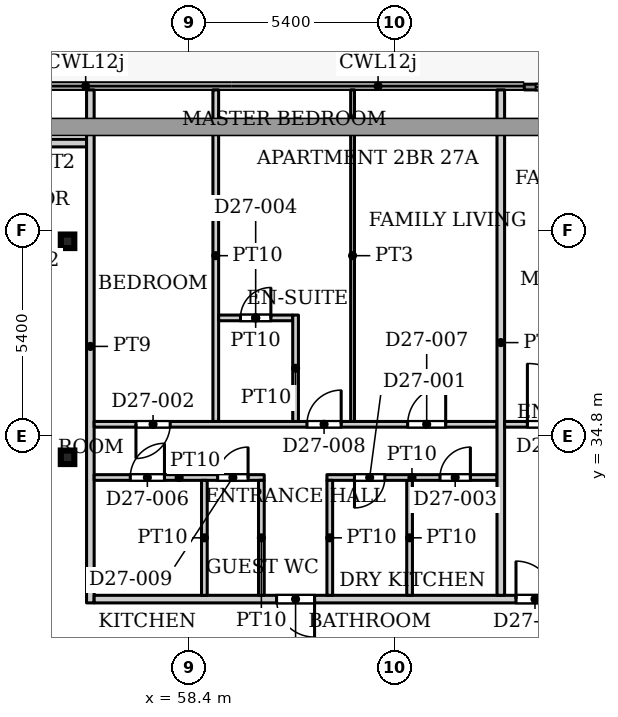
"""IFC4 building model, lengths in metres.
Left out: names, types, materials, properties, quantities, classifications, styles, units other than length and angle.
Written with IfcOpenShell. Run it as: python <this file> out.ifc"""

import sys

from ifc_helpers import new_model, si_unit, direction, frame, frame_2d, origin, origin_2d, place, context, subcontext, project, spatial, rectangle, hollow_rectangle, extrude, source, transform, mapped, element, fill, save


model = new_model("IFC4")
c1 = context("Model", 3, precision=1e-05, world=origin(), true_north=direction((0.0, 1.0)))
c2 = subcontext(c1, "Body", "Model", "MODEL_VIEW")
j1 = project(units=[si_unit("LENGTHUNIT", "METRE"), si_unit("PLANEANGLEUNIT", "RADIAN")], contexts=[c1])
p1 = place(None, origin())
s1 = spatial("IfcSite", under=j1, at=p1, CompositionType="ELEMENT")
p2 = place(p1, origin())
s2 = spatial("IfcBuilding", under=s1, at=p2, CompositionType="ELEMENT")
p3 = place(p2, frame((0.0, 0.0, 117.5)))
s3 = spatial("IfcBuildingStorey", under=s2, at=p3, CompositionType="ELEMENT", Elevation=117.5)
for number, where, z_axis, x_axis in (
    (1, (55.2, 34.232, 0.0), (0.0, 0.0, 1.0), (1.0, 0.0, 0.0)),
    (2, (55.2, 39.916, 0.0), (0.0, 0.0, 1.0), (1.0, 0.0, 0.0)),
):
    element("IfcColumn", number, at=place(p3, frame(where, z_axis=z_axis, x_axis=x_axis)), inside=s3, PredefinedType="COLUMN", context=c2, shape_type="SweptSolid", body=[
        extrude(hollow_rectangle(XDim=0.356, YDim=0.356, WallThickness=0.016, InnerFilletRadius=0.016, OuterFilletRadius=0.032, at=origin_2d()), origin(), (0.0, 0.0, 1.0), 3.9),
    ])
p4 = place(p3, frame((67.218, 43.975, 0.0), z_axis=(0.0, 0.0, 1.0), x_axis=(1.0, 0.0, 0.0)))
e3 = element("IfcWall", 3, at=p4, inside=s3, PredefinedType="SOLIDWALL", context=c2, shape_type="SweptSolid", body=[
    extrude(rectangle(XDim=2.4, YDim=0.15, at=frame_2d((1.2, 0.0))), origin(), (0.0, 0.0, 1.0), 3.75),
])
p5 = place(p4, frame((0.3, 0.0, 0.0)))
e4 = element("IfcOpeningElement", 4, at=p5, cuts=e3, PredefinedType="OPENING", context=c2, shape_type="SweptSolid", body=[
    extrude(rectangle(XDim=1.8, YDim=2.4, at=frame_2d((0.9, 1.2))), frame((0.0, 0.085, 0.0), z_axis=(0.0, -1.0, 0.0), x_axis=(1.0, 0.0, 0.0)), (0.0, 0.0, 1.0), 0.17),
])
p6 = place(p3, frame((53.5, 42.5, 0.0), z_axis=(0.0, 0.0, 1.0), x_axis=(1.0, 0.0, 0.0)))
e5 = element("IfcWall", 5, at=p6, inside=s3, PredefinedType="PARTITIONING", context=c2, shape_type="SweptSolid", body=[
    extrude(rectangle(XDim=2.2, YDim=0.2, at=frame_2d((1.1, 0.0))), origin(), (0.0, 0.0, 1.0), 3.6),
])
p7 = place(p3, frame((55.8, 30.4, 0.0), z_axis=(0.0, 0.0, 1.0), x_axis=(0.0, 1.0, 0.0)))
e6 = element("IfcWall", 6, at=p7, inside=s3, PredefinedType="PARTITIONING", context=c2, shape_type="SweptSolid", body=[
    extrude(rectangle(XDim=13.5, YDim=0.2, at=frame_2d((6.75, 0.0))), origin(), (0.0, 0.0, 1.0), 3.6),
])
p8 = place(p3, frame((55.9, 30.5, 0.0), z_axis=(0.0, 0.0, 1.0), x_axis=(1.0, 0.0, 0.0)))
e7 = element("IfcWall", 7, at=p8, inside=s3, PredefinedType="PARTITIONING", context=c2, shape_type="SweptSolid", body=[
    extrude(rectangle(XDim=42.2, YDim=0.2, at=frame_2d((21.1, 0.0))), origin(), (0.0, 0.0, 1.0), 3.6),
])
p9 = place(p8, frame((4.8, 0.0, 0.0)))
e8 = element("IfcOpeningElement", 8, at=p9, cuts=e7, PredefinedType="OPENING", context=c2, shape_type="SweptSolid", body=[
    extrude(rectangle(XDim=1.0, YDim=2.1, at=frame_2d((0.5, 1.05))), frame((0.0, 0.11, 0.0), z_axis=(0.0, -1.0, 0.0), x_axis=(1.0, 0.0, 0.0)), (0.0, 0.0, 1.0), 0.22),
])
p10 = place(p8, frame((11.1, 0.0, 0.0)))
e9 = element("IfcOpeningElement", 9, at=p10, cuts=e7, PredefinedType="OPENING", context=c2, shape_type="SweptSolid", body=[
    extrude(rectangle(XDim=1.0, YDim=2.1, at=frame_2d((0.5, 1.05))), frame((0.0, 0.11, 0.0), z_axis=(0.0, -1.0, 0.0), x_axis=(1.0, 0.0, 0.0)), (0.0, 0.0, 1.0), 0.22),
])
p11 = place(p8, frame((39.0, 0.0, 0.0)))
e10 = element("IfcOpeningElement", 10, at=p11, cuts=e7, PredefinedType="OPENING", context=c2, shape_type="SweptSolid", body=[
    extrude(rectangle(XDim=1.0, YDim=2.1, at=frame_2d((0.5, 1.05))), frame((0.0, 0.11, 0.0), z_axis=(0.0, -1.0, 0.0), x_axis=(1.0, 0.0, 0.0)), (0.0, 0.0, 1.0), 0.22),
])
p12 = place(p3, frame((55.9, 33.7, 0.0), z_axis=(0.0, 0.0, 1.0), x_axis=(1.0, 0.0, 0.0)))
e11 = element("IfcWall", 11, at=p12, inside=s3, PredefinedType="PARTITIONING", context=c2, shape_type="SweptSolid", body=[
    extrude(rectangle(XDim=4.475, YDim=0.15, at=frame_2d((2.238, 0.0))), origin(), (0.0, 0.0, 1.0), 3.6),
])
p13 = place(p12, frame((0.95, 0.0, 0.0)))
e12 = element("IfcOpeningElement", 12, at=p13, cuts=e11, PredefinedType="OPENING", context=c2, shape_type="SweptSolid", body=[
    extrude(rectangle(XDim=0.9, YDim=2.1, at=frame_2d((0.45, 1.05))), frame((0.0, 0.085, 0.0), z_axis=(0.0, -1.0, 0.0), x_axis=(1.0, 0.0, 0.0)), (0.0, 0.0, 1.0), 0.17),
])
p14 = place(p12, frame((3.25, 0.0, 0.0)))
e13 = element("IfcOpeningElement", 13, at=p14, cuts=e11, PredefinedType="OPENING", context=c2, shape_type="SweptSolid", body=[
    extrude(rectangle(XDim=0.8, YDim=2.1, at=frame_2d((0.4, 1.05))), frame((0.0, 0.085, 0.0), z_axis=(0.0, -1.0, 0.0), x_axis=(1.0, 0.0, 0.0)), (0.0, 0.0, 1.0), 0.17),
])
p15 = place(p3, frame((55.9, 35.1, 0.0), z_axis=(0.0, 0.0, 1.0), x_axis=(1.0, 0.0, 0.0)))
e14 = element("IfcWall", 14, at=p15, inside=s3, PredefinedType="PARTITIONING", context=c2, shape_type="SweptSolid", body=[
    extrude(rectangle(XDim=10.6, YDim=0.15, at=frame_2d((5.3, 0.0))), origin(), (0.0, 0.0, 1.0), 3.6),
])
p16 = place(p15, frame((1.1, 0.0, 0.0)))
e15 = element("IfcOpeningElement", 15, at=p16, cuts=e14, PredefinedType="OPENING", context=c2, shape_type="SweptSolid", body=[
    extrude(rectangle(XDim=0.9, YDim=2.1, at=frame_2d((0.45, 1.05))), frame((0.0, 0.085, 0.0), z_axis=(0.0, -1.0, 0.0), x_axis=(1.0, 0.0, 0.0)), (0.0, 0.0, 1.0), 0.17),
])
p17 = place(p15, frame((8.25, 0.0, 0.0)))
e16 = element("IfcOpeningElement", 16, at=p17, cuts=e14, PredefinedType="OPENING", context=c2, shape_type="SweptSolid", body=[
    extrude(rectangle(XDim=1.0, YDim=2.1, at=frame_2d((0.5, 1.05))), frame((0.0, 0.085, 0.0), z_axis=(0.0, -1.0, 0.0), x_axis=(1.0, 0.0, 0.0)), (0.0, 0.0, 1.0), 0.17),
])
p18 = place(p15, frame((5.6, 0.0, 0.0)))
e17 = element("IfcOpeningElement", 17, at=p18, cuts=e14, PredefinedType="OPENING", context=c2, shape_type="SweptSolid", body=[
    extrude(rectangle(XDim=0.9, YDim=2.1, at=frame_2d((0.45, 1.05))), frame((0.0, 0.085, 0.0), z_axis=(0.0, -1.0, 0.0), x_axis=(1.0, 0.0, 0.0)), (0.0, 0.0, 1.0), 0.17),
])
p19 = place(p3, frame((58.8, 30.6, 0.0), z_axis=(0.0, 0.0, 1.0), x_axis=(0.0, 1.0, 0.0)))
e18 = element("IfcWall", 18, at=p19, inside=s3, PredefinedType="PARTITIONING", context=c2, shape_type="SweptSolid", body=[
    extrude(rectangle(XDim=3.025, YDim=0.15, at=frame_2d((1.512, 0.0))), origin(), (0.0, 0.0, 1.0), 3.6),
])
p20 = place(p3, frame((59.1, 35.175, 0.0), z_axis=(0.0, 0.0, 1.0), x_axis=(0.0, 1.0, 0.0)))
e19 = element("IfcWall", 19, at=p20, inside=s3, PredefinedType="PARTITIONING", context=c2, shape_type="SweptSolid", body=[
    extrude(rectangle(XDim=8.725, YDim=0.15, at=frame_2d((4.362, 0.0))), origin(), (0.0, 0.0, 1.0), 3.6),
])
p21 = place(p3, frame((59.175, 37.9, 0.0), z_axis=(0.0, 0.0, 1.0), x_axis=(1.0, 0.0, 0.0)))
e20 = element("IfcWall", 20, at=p21, inside=s3, PredefinedType="PARTITIONING", context=c2, shape_type="SweptSolid", body=[
    extrude(rectangle(XDim=1.95, YDim=0.15, at=frame_2d((0.975, 0.0))), origin(), (0.0, 0.0, 1.0), 3.6),
])
p22 = place(p21, frame((0.575, 0.0, 0.0)))
e21 = element("IfcOpeningElement", 21, at=p22, cuts=e20, PredefinedType="OPENING", context=c2, shape_type="SweptSolid", body=[
    extrude(rectangle(XDim=0.8, YDim=2.1, at=frame_2d((0.4, 1.05))), frame((0.0, 0.085, 0.0), z_axis=(0.0, -1.0, 0.0), x_axis=(1.0, 0.0, 0.0)), (0.0, 0.0, 1.0), 0.17),
])
p23 = place(p3, frame((60.3, 30.6, 0.0), z_axis=(0.0, 0.0, 1.0), x_axis=(0.0, 1.0, 0.0)))
e22 = element("IfcWall", 22, at=p23, inside=s3, PredefinedType="PARTITIONING", context=c2, shape_type="SweptSolid", body=[
    extrude(rectangle(XDim=3.025, YDim=0.15, at=frame_2d((1.512, 0.0))), origin(), (0.0, 0.0, 1.0), 3.6),
])
p24 = place(p3, frame((61.2, 35.175, 0.0), z_axis=(0.0, 0.0, 1.0), x_axis=(0.0, 1.0, 0.0)))
e23 = element("IfcWall", 23, at=p24, inside=s3, PredefinedType="PARTITIONING", context=c2, shape_type="SweptSolid", body=[
    extrude(rectangle(XDim=2.8, YDim=0.15, at=frame_2d((1.4, 0.0))), origin(), (0.0, 0.0, 1.0), 3.6),
])
p25 = place(p3, frame((62.025, 33.7, 0.0), z_axis=(0.0, 0.0, 1.0), x_axis=(1.0, 0.0, 0.0)))
e24 = element("IfcWall", 24, at=p25, inside=s3, PredefinedType="PARTITIONING", context=c2, shape_type="SweptSolid", body=[
    extrude(rectangle(XDim=4.475, YDim=0.15, at=frame_2d((2.238, 0.0))), origin(), (0.0, 0.0, 1.0), 3.6),
])
p26 = place(p25, frame((0.725, 0.0, 0.0)))
e25 = element("IfcOpeningElement", 25, at=p26, cuts=e24, PredefinedType="OPENING", context=c2, shape_type="SweptSolid", body=[
    extrude(rectangle(XDim=0.8, YDim=2.1, at=frame_2d((0.4, 1.05))), frame((0.0, 0.085, 0.0), z_axis=(0.0, -1.0, 0.0), x_axis=(1.0, 0.0, 0.0)), (0.0, 0.0, 1.0), 0.17),
])
p27 = place(p25, frame((2.975, 0.0, 0.0)))
e26 = element("IfcOpeningElement", 26, at=p27, cuts=e24, PredefinedType="OPENING", context=c2, shape_type="SweptSolid", body=[
    extrude(rectangle(XDim=0.8, YDim=2.1, at=frame_2d((0.4, 1.05))), frame((0.0, 0.085, 0.0), z_axis=(0.0, -1.0, 0.0), x_axis=(1.0, 0.0, 0.0)), (0.0, 0.0, 1.0), 0.17),
])
p28 = place(p3, frame((62.1, 30.6, 0.0), z_axis=(0.0, 0.0, 1.0), x_axis=(0.0, 1.0, 0.0)))
e27 = element("IfcWall", 27, at=p28, inside=s3, PredefinedType="PARTITIONING", context=c2, shape_type="SweptSolid", body=[
    extrude(rectangle(XDim=3.025, YDim=0.15, at=frame_2d((1.512, 0.0))), origin(), (0.0, 0.0, 1.0), 3.6),
])
p29 = place(p3, frame((62.7, 35.175, 0.0), z_axis=(0.0, 0.0, 1.0), x_axis=(0.0, 1.0, 0.0)))
e28 = element("IfcWall", 28, at=p29, inside=s3, PredefinedType="PARTITIONING", context=c2, shape_type="SweptSolid", body=[
    extrude(rectangle(XDim=8.725, YDim=0.1, at=frame_2d((4.362, 0.0))), origin(), (0.0, 0.0, 1.0), 3.6),
])
p30 = place(p3, frame((64.2, 30.6, 0.0), z_axis=(0.0, 0.0, 1.0), x_axis=(0.0, 1.0, 0.0)))
e29 = element("IfcWall", 29, at=p30, inside=s3, PredefinedType="PARTITIONING", context=c2, shape_type="SweptSolid", body=[
    extrude(rectangle(XDim=3.025, YDim=0.15, at=frame_2d((1.512, 0.0))), origin(), (0.0, 0.0, 1.0), 3.6),
])
p31 = place(p3, frame((66.6, 30.6, 0.0), z_axis=(0.0, 0.0, 1.0), x_axis=(0.0, 1.0, 0.0)))
e30 = element("IfcWall", 30, at=p31, inside=s3, PredefinedType="PARTITIONING", context=c2, shape_type="SweptSolid", body=[
    extrude(rectangle(XDim=13.3, YDim=0.2, at=frame_2d((6.65, 0.0))), origin(), (0.0, 0.0, 1.0), 3.6),
])
p32 = place(p3, frame((66.7, 35.1, 0.0), z_axis=(0.0, 0.0, 1.0), x_axis=(1.0, 0.0, 0.0)))
e31 = element("IfcWall", 31, at=p32, inside=s3, PredefinedType="PARTITIONING", context=c2, shape_type="SweptSolid", body=[
    extrude(rectangle(XDim=14.8, YDim=0.15, at=frame_2d((7.4, 0.0))), origin(), (0.0, 0.0, 1.0), 3.6),
])
p33 = place(p32, frame((10.25, 0.0, 0.0)))
e32 = element("IfcOpeningElement", 32, at=p33, cuts=e31, PredefinedType="OPENING", context=c2, shape_type="SweptSolid", body=[
    extrude(rectangle(XDim=0.9, YDim=2.1, at=frame_2d((0.45, 1.05))), frame((0.0, 0.085, 0.0), z_axis=(0.0, -1.0, 0.0), x_axis=(1.0, 0.0, 0.0)), (0.0, 0.0, 1.0), 0.17),
])
p34 = place(p32, frame((12.95, 0.0, 0.0)))
e33 = element("IfcOpeningElement", 33, at=p34, cuts=e31, PredefinedType="OPENING", context=c2, shape_type="SweptSolid", body=[
    extrude(rectangle(XDim=0.9, YDim=2.1, at=frame_2d((0.45, 1.05))), frame((0.0, 0.085, 0.0), z_axis=(0.0, -1.0, 0.0), x_axis=(1.0, 0.0, 0.0)), (0.0, 0.0, 1.0), 0.17),
])
p35 = place(p32, frame((3.9, 0.0, 0.0)))
e34 = element("IfcOpeningElement", 34, at=p35, cuts=e31, PredefinedType="OPENING", context=c2, shape_type="SweptSolid", body=[
    extrude(rectangle(XDim=1.0, YDim=2.1, at=frame_2d((0.5, 1.05))), frame((0.0, 0.085, 0.0), z_axis=(0.0, -1.0, 0.0), x_axis=(1.0, 0.0, 0.0)), (0.0, 0.0, 1.0), 0.17),
])
p36 = place(p32, frame((0.6, 0.0, 0.0)))
e35 = element("IfcOpeningElement", 35, at=p36, cuts=e31, PredefinedType="OPENING", context=c2, shape_type="SweptSolid", body=[
    extrude(rectangle(XDim=1.6, YDim=2.1, at=frame_2d((0.8, 1.05))), frame((0.0, 0.085, 0.0), z_axis=(0.0, -1.0, 0.0), x_axis=(1.0, 0.0, 0.0)), (0.0, 0.0, 1.0), 0.17),
])
p37 = place(p32, frame((8.3, 0.0, 0.0)))
e36 = element("IfcOpeningElement", 36, at=p37, cuts=e31, PredefinedType="OPENING", context=c2, shape_type="SweptSolid", body=[
    extrude(rectangle(XDim=0.9, YDim=2.1, at=frame_2d((0.45, 1.05))), frame((0.0, 0.085, 0.0), z_axis=(0.0, -1.0, 0.0), x_axis=(1.0, 0.0, 0.0)), (0.0, 0.0, 1.0), 0.17),
])
m1 = source(origin(), c2, "Body", "SweptSolid", [
    extrude(rectangle(XDim=1.8, YDim=2.4, at=frame_2d((0.9, 1.2))), frame((0.0, 0.025, 0.0), z_axis=(0.0, -1.0, 0.0), x_axis=(1.0, 0.0, 0.0)), (0.0, 0.0, 1.0), 0.05),
])
p38 = place(p5, origin())
e37 = element("IfcDoor", 37, at=p38, inside=s3, OperationType="SLIDING_TO_LEFT", PredefinedType="DOOR", context=c2, shape_type="MappedRepresentation", body=[
    mapped(m1, transform((0.0, 0.0, 0.0), x_axis=(1.0, 0.0, 0.0), y_axis=(0.0, 1.0, 0.0), z_axis=(0.0, 0.0, 1.0), scale=1.0)),
])
fill(e4, e37)
m2 = source(origin(), c2, "Body", "SweptSolid", [
    extrude(rectangle(XDim=0.8, YDim=2.1, at=frame_2d((0.4, 1.05))), frame((0.0, 0.025, 0.0), z_axis=(0.0, -1.0, 0.0), x_axis=(1.0, 0.0, 0.0)), (0.0, 0.0, 1.0), 0.05),
])
p39 = place(p26, origin())
e38 = element("IfcDoor", 38, at=p39, inside=s3, OperationType="SINGLE_SWING_RIGHT", PredefinedType="DOOR", context=c2, shape_type="MappedRepresentation", body=[
    mapped(m2, transform((0.0, 0.0, 0.0), x_axis=(1.0, 0.0, 0.0), y_axis=(0.0, 1.0, 0.0), z_axis=(0.0, 0.0, 1.0), scale=1.0)),
])
fill(e25, e38)
m3 = source(origin(), c2, "Body", "SweptSolid", [
    extrude(rectangle(XDim=0.9, YDim=2.1, at=frame_2d((0.45, 1.05))), frame((0.0, 0.025, 0.0), z_axis=(0.0, -1.0, 0.0), x_axis=(1.0, 0.0, 0.0)), (0.0, 0.0, 1.0), 0.05),
])
p40 = place(p16, origin())
e39 = element("IfcDoor", 39, at=p40, inside=s3, OperationType="SINGLE_SWING_RIGHT", PredefinedType="DOOR", context=c2, shape_type="MappedRepresentation", body=[
    mapped(m3, transform((0.0, 0.0, 0.0), x_axis=(1.0, 0.0, 0.0), y_axis=(0.0, 1.0, 0.0), z_axis=(0.0, 0.0, 1.0), scale=1.0)),
])
fill(e15, e39)
p41 = place(p27, origin())
e40 = element("IfcDoor", 40, at=p41, inside=s3, OperationType="SINGLE_SWING_LEFT", PredefinedType="DOOR", context=c2, shape_type="MappedRepresentation", body=[
    mapped(m2, transform((0.0, 0.0, 0.0), x_axis=(1.0, 0.0, 0.0), y_axis=(0.0, 1.0, 0.0), z_axis=(0.0, 0.0, 1.0), scale=1.0)),
])
fill(e26, e40)
p42 = place(p22, origin())
e41 = element("IfcDoor", 41, at=p42, inside=s3, OperationType="SINGLE_SWING_LEFT", PredefinedType="DOOR", context=c2, shape_type="MappedRepresentation", body=[
    mapped(m2, transform((0.0, 0.0, 0.0), x_axis=(1.0, 0.0, 0.0), y_axis=(0.0, 1.0, 0.0), z_axis=(0.0, 0.0, 1.0), scale=1.0)),
])
fill(e21, e41)
m4 = source(origin(), c2, "Body", "SweptSolid", [
    extrude(rectangle(XDim=1.0, YDim=2.1, at=frame_2d((0.5, 1.05))), frame((0.0, 0.025, 0.0), z_axis=(0.0, -1.0, 0.0), x_axis=(1.0, 0.0, 0.0)), (0.0, 0.0, 1.0), 0.05),
])
p43 = place(p9, origin())
e42 = element("IfcDoor", 42, at=p43, inside=s3, OperationType="SINGLE_SWING_RIGHT", PredefinedType="DOOR", context=c2, shape_type="MappedRepresentation", body=[
    mapped(m4, transform((0.0, 0.0, 0.0), x_axis=(1.0, 0.0, 0.0), y_axis=(0.0, 1.0, 0.0), z_axis=(0.0, 0.0, 1.0), scale=1.0)),
])
fill(e8, e42)
p44 = place(p13, origin())
e43 = element("IfcDoor", 43, at=p44, inside=s3, OperationType="SINGLE_SWING_LEFT", PredefinedType="DOOR", context=c2, shape_type="MappedRepresentation", body=[
    mapped(m3, transform((0.0, 0.0, 0.0), x_axis=(1.0, 0.0, 0.0), y_axis=(0.0, 1.0, 0.0), z_axis=(0.0, 0.0, 1.0), scale=1.0)),
])
fill(e12, e43)
m5 = source(origin(), c2, "Body", "SweptSolid", [
    extrude(rectangle(XDim=1.0, YDim=2.1, at=frame_2d((0.5, 1.05))), frame((0.0, 0.025, 0.0), z_axis=(0.0, -1.0, 0.0), x_axis=(1.0, 0.0, 0.0)), (0.0, 0.0, 1.0), 0.05),
])
p45 = place(p17, origin())
e44 = element("IfcDoor", 44, at=p45, inside=s3, OperationType="SINGLE_SWING_LEFT", PredefinedType="DOOR", context=c2, shape_type="MappedRepresentation", body=[
    mapped(m5, transform((0.0, 0.0, 0.0), x_axis=(1.0, 0.0, 0.0), y_axis=(0.0, 1.0, 0.0), z_axis=(0.0, 0.0, 1.0), scale=1.0)),
])
fill(e16, e44)
p46 = place(p18, origin())
e45 = element("IfcDoor", 45, at=p46, inside=s3, OperationType="SINGLE_SWING_LEFT", PredefinedType="DOOR", context=c2, shape_type="MappedRepresentation", body=[
    mapped(m3, transform((0.0, 0.0, 0.0), x_axis=(1.0, 0.0, 0.0), y_axis=(0.0, 1.0, 0.0), z_axis=(0.0, 0.0, 1.0), scale=1.0)),
])
fill(e17, e45)
p47 = place(p14, origin())
e46 = element("IfcDoor", 46, at=p47, inside=s3, OperationType="SINGLE_SWING_LEFT", PredefinedType="DOOR", context=c2, shape_type="MappedRepresentation", body=[
    mapped(m2, transform((0.0, 0.0, 0.0), x_axis=(1.0, 0.0, 0.0), y_axis=(0.0, 1.0, 0.0), z_axis=(0.0, 0.0, 1.0), scale=1.0)),
])
fill(e13, e46)
p48 = place(p10, origin())
e47 = element("IfcDoor", 47, at=p48, inside=s3, OperationType="SINGLE_SWING_LEFT", PredefinedType="DOOR", context=c2, shape_type="MappedRepresentation", body=[
    mapped(m4, transform((0.0, 0.0, 0.0), x_axis=(1.0, 0.0, 0.0), y_axis=(0.0, 1.0, 0.0), z_axis=(0.0, 0.0, 1.0), scale=1.0)),
])
fill(e9, e47)
m6 = source(origin(), c2, "Body", "SweptSolid", [
    extrude(rectangle(XDim=1.6, YDim=2.1, at=frame_2d((0.8, 1.05))), frame((0.0, 0.025, 0.0), z_axis=(0.0, -1.0, 0.0), x_axis=(1.0, 0.0, 0.0)), (0.0, 0.0, 1.0), 0.05),
])
p49 = place(p36, origin())
e48 = element("IfcDoor", 48, at=p49, inside=s3, OperationType="DOUBLE_DOOR_SINGLE_SWING", PredefinedType="DOOR", context=c2, shape_type="MappedRepresentation", body=[
    mapped(m6, transform((0.0, 0.0, 0.0), x_axis=(1.0, 0.0, 0.0), y_axis=(0.0, 1.0, 0.0), z_axis=(0.0, 0.0, 1.0), scale=1.0)),
])
fill(e35, e48)
save(model, sys.argv[1])
